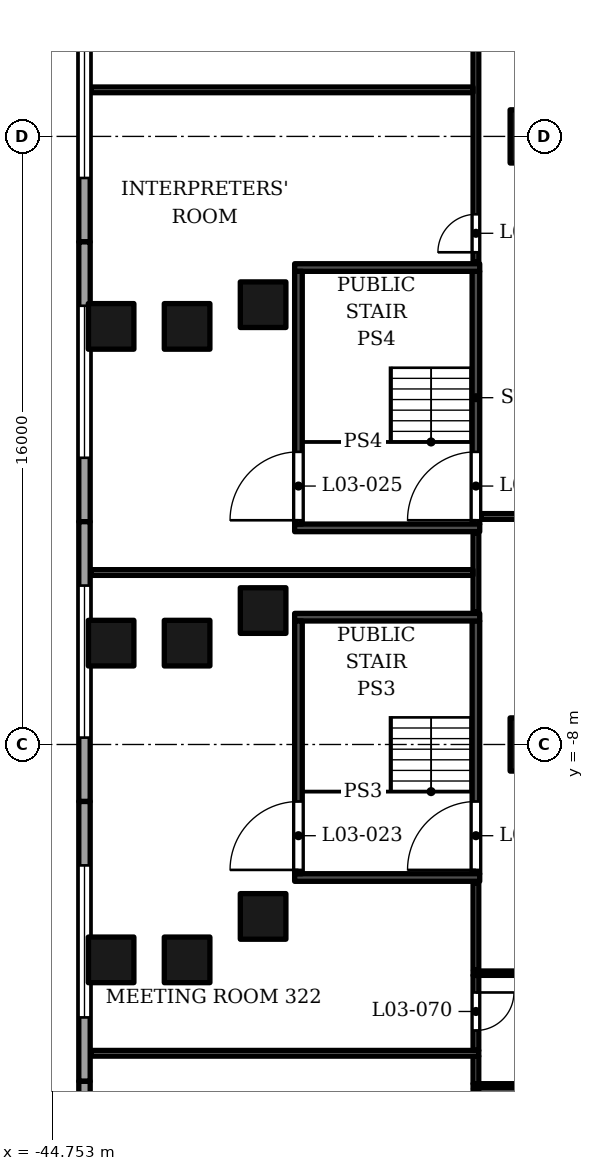
"""IFC4 building model, lengths in metres.
Left out: names, types, materials, properties, quantities, classifications, styles, units other than length and angle.
Written with IfcOpenShell. Run it as: python <this file> out.ifc"""

import sys

from ifc_helpers import new_model, si_unit, direction, frame, frame_2d, origin, origin_2d, place, context, subcontext, project, spatial, rectangle, extrude, element, fill, save


model = new_model("IFC4")
c1 = context("Model", 3, precision=1e-05, world=origin(), true_north=direction((0.0, 1.0)))
c2 = subcontext(c1, "Body", "Model", "MODEL_VIEW")
j1 = project(units=[si_unit("LENGTHUNIT", "METRE"), si_unit("PLANEANGLEUNIT", "RADIAN")], contexts=[c1])
p1 = place(None, origin())
s1 = spatial("IfcSite", under=j1, at=p1, CompositionType="ELEMENT")
p2 = place(p1, origin())
s2 = spatial("IfcBuilding", under=s1, at=p2, CompositionType="ELEMENT")
p3 = place(p2, frame((0.0, 0.0, 29.0)))
s3 = spatial("IfcBuildingStorey", under=s2, at=p3, CompositionType="ELEMENT", Elevation=29.0)
for number, where, z_axis, x_axis in (
    (1, (-32.0, -8.0, 0.0), (0.0, 0.0, 1.0), (1.0, 0.0, 0.0)),
    (2, (-32.0, 8.0, 0.0), (0.0, 0.0, 1.0), (1.0, 0.0, 0.0)),
):
    element("IfcColumn", number, at=place(p3, frame(where, z_axis=z_axis, x_axis=x_axis)), inside=s3, PredefinedType="COLUMN", context=c2, shape_type="SweptSolid", body=[
        extrude(rectangle(XDim=1.4, YDim=1.4, at=origin_2d()), origin(), (0.0, 0.0, 1.0), 5.5),
    ])
for number, where, z_axis, x_axis in (
    (3, (-39.2, -12.524, 0.0), (0.0, 0.0, 1.0), (1.0, 0.0, 0.0)),
    (4, (-39.2, -4.476, 0.0), (0.0, 0.0, 1.0), (1.0, 0.0, 0.0)),
    (5, (-39.2, 3.572, 0.0), (0.0, 0.0, 1.0), (1.0, 0.0, 0.0)),
    (6, (-41.2, -13.667, 0.0), (0.0, 0.0, 1.0), (1.0, 0.0, 0.0)),
    (7, (-41.2, -5.333, 0.0), (0.0, 0.0, 1.0), (1.0, 0.0, 0.0)),
    (8, (-41.2, 3.001, 0.0), (0.0, 0.0, 1.0), (1.0, 0.0, 0.0)),
    (9, (-43.2, -13.667, 0.0), (0.0, 0.0, 1.0), (1.0, 0.0, 0.0)),
    (10, (-43.2, -5.333, 0.0), (0.0, 0.0, 1.0), (1.0, 0.0, 0.0)),
    (11, (-43.2, 3.001, 0.0), (0.0, 0.0, 1.0), (1.0, 0.0, 0.0)),
):
    element("IfcColumn", number, at=place(p3, frame(where, z_axis=z_axis, x_axis=x_axis)), inside=s3, PredefinedType="COLUMN", context=c2, shape_type="SweptSolid", body=[
        extrude(rectangle(XDim=1.2, YDim=1.2, at=origin_2d()), origin(), (0.0, 0.0, 1.0), 5.5),
    ])
p4 = place(p3, frame((-43.9, 12.587, 0.0), z_axis=(0.0, 0.0, 1.0), x_axis=(0.0, -1.0, 0.0)))
e12 = element("IfcWall", 12, at=p4, inside=s3, PredefinedType="SOLIDWALL", context=c2, shape_type="SweptSolid", body=[
    extrude(rectangle(XDim=7.362, YDim=0.3, at=frame_2d((3.681, 0.0))), origin(), (0.0, 0.0, 1.0), 4.1),
])
p5 = place(p4, frame((1.681, 0.0, 1.0)))
e13 = element("IfcOpeningElement", 13, at=p5, cuts=e12, PredefinedType="OPENING", context=c2, shape_type="SweptSolid", body=[
    extrude(rectangle(XDim=4.0, YDim=1.8, at=frame_2d((2.0, 0.9))), frame((0.0, 0.16, 0.0), z_axis=(0.0, -1.0, 0.0), x_axis=(1.0, 0.0, 0.0)), (0.0, 0.0, 1.0), 0.32),
])
p6 = place(p3, frame((-43.9, 5.225, 0.0), z_axis=(0.0, 0.0, 1.0), x_axis=(0.0, -1.0, 0.0)))
e14 = element("IfcWall", 14, at=p6, inside=s3, PredefinedType="SOLIDWALL", context=c2, shape_type="SweptSolid", body=[
    extrude(rectangle(XDim=7.363, YDim=0.3, at=frame_2d((3.681, 0.0))), origin(), (0.0, 0.0, 1.0), 4.1),
])
p7 = place(p6, frame((1.681, 0.0, 1.0)))
e15 = element("IfcOpeningElement", 15, at=p7, cuts=e14, PredefinedType="OPENING", context=c2, shape_type="SweptSolid", body=[
    extrude(rectangle(XDim=4.0, YDim=1.8, at=frame_2d((2.0, 0.9))), frame((0.0, 0.16, 0.0), z_axis=(0.0, -1.0, 0.0), x_axis=(1.0, 0.0, 0.0)), (0.0, 0.0, 1.0), 0.32),
])
p8 = place(p3, frame((-43.9, -2.137, 0.0), z_axis=(0.0, 0.0, 1.0), x_axis=(0.0, -1.0, 0.0)))
e16 = element("IfcWall", 16, at=p8, inside=s3, PredefinedType="SOLIDWALL", context=c2, shape_type="SweptSolid", body=[
    extrude(rectangle(XDim=7.363, YDim=0.3, at=frame_2d((3.681, 0.0))), origin(), (0.0, 0.0, 1.0), 4.1),
])
p9 = place(p8, frame((1.681, 0.0, 1.0)))
e17 = element("IfcOpeningElement", 17, at=p9, cuts=e16, PredefinedType="OPENING", context=c2, shape_type="SweptSolid", body=[
    extrude(rectangle(XDim=4.0, YDim=1.8, at=frame_2d((2.0, 0.9))), frame((0.0, 0.16, 0.0), z_axis=(0.0, -1.0, 0.0), x_axis=(1.0, 0.0, 0.0)), (0.0, 0.0, 1.0), 0.32),
])
p10 = place(p3, frame((-43.9, -9.5, 0.0), z_axis=(0.0, 0.0, 1.0), x_axis=(0.0, -1.0, 0.0)))
e18 = element("IfcWall", 18, at=p10, inside=s3, PredefinedType="SOLIDWALL", context=c2, shape_type="SweptSolid", body=[
    extrude(rectangle(XDim=7.363, YDim=0.3, at=frame_2d((3.681, 0.0))), origin(), (0.0, 0.0, 1.0), 4.1),
])
p11 = place(p10, frame((1.681, 0.0, 1.0)))
e19 = element("IfcOpeningElement", 19, at=p11, cuts=e18, PredefinedType="OPENING", context=c2, shape_type="SweptSolid", body=[
    extrude(rectangle(XDim=4.0, YDim=1.8, at=frame_2d((2.0, 0.9))), frame((0.0, 0.16, 0.0), z_axis=(0.0, -1.0, 0.0), x_axis=(1.0, 0.0, 0.0)), (0.0, 0.0, 1.0), 0.32),
])
p12 = place(p3, frame((-43.9, -16.863, 0.0), z_axis=(0.0, 0.0, 1.0), x_axis=(0.0, -1.0, 0.0)))
e20 = element("IfcWall", 20, at=p12, inside=s3, PredefinedType="SOLIDWALL", context=c2, shape_type="SweptSolid", body=[
    extrude(rectangle(XDim=7.363, YDim=0.3, at=frame_2d((3.681, 0.0))), origin(), (0.0, 0.0, 1.0), 4.1),
])
p13 = place(p12, frame((1.681, 0.0, 1.0)))
e21 = element("IfcOpeningElement", 21, at=p13, cuts=e20, PredefinedType="OPENING", context=c2, shape_type="SweptSolid", body=[
    extrude(rectangle(XDim=4.0, YDim=1.8, at=frame_2d((2.0, 0.9))), frame((0.0, 0.16, 0.0), z_axis=(0.0, -1.0, 0.0), x_axis=(1.0, 0.0, 0.0)), (0.0, 0.0, 1.0), 0.32),
])
for number, where, z_axis, x_axis in (
    (22, (-43.85, 19.79, 5.5), (0.0, 0.0, 1.0), (0.0, -1.0, 0.0)),
    (23, (-43.85, 5.093, 5.5), (0.0, 0.0, 1.0), (0.0, -1.0, 0.0)),
    (24, (-43.85, -9.605, 5.5), (0.0, 0.0, 1.0), (0.0, -1.0, 0.0)),
):
    element("IfcWall", number, at=place(p3, frame(where, z_axis=z_axis, x_axis=x_axis)), inside=s3, PredefinedType="PARAPET", context=c2, shape_type="SweptSolid", body=[
        extrude(rectangle(XDim=14.698, YDim=0.3, at=frame_2d((7.349, 0.0))), origin(), (0.0, 0.0, 1.0), 1.1),
    ])
for number, where, z_axis, x_axis in (
    (25, (-38.37, -11.5, 0.0), (0.0, 0.0, 1.0), (1.0, 0.0, 0.0)),
    (26, (-38.37, -4.65, 0.0), (0.0, 0.0, 1.0), (1.0, 0.0, 0.0)),
):
    element("IfcWall", number, at=place(p3, frame(where, z_axis=z_axis, x_axis=x_axis)), inside=s3, PredefinedType="SOLIDWALL", context=c2, shape_type="SweptSolid", body=[
        extrude(rectangle(XDim=4.87, YDim=0.2, at=frame_2d((2.435, 0.0))), origin(), (0.0, 0.0, 1.0), 5.05),
    ])
p14 = place(p3, frame((-38.27, -11.4, 0.0), z_axis=(0.0, 0.0, 1.0), x_axis=(0.0, 1.0, 0.0)))
e27 = element("IfcWall", 27, at=p14, inside=s3, PredefinedType="SOLIDWALL", context=c2, shape_type="SweptSolid", body=[
    extrude(rectangle(XDim=6.65, YDim=0.2, at=frame_2d((3.325, 0.0))), origin(), (0.0, 0.0, 1.0), 5.05),
])
p15 = place(p14, frame((0.1, 0.0, 0.0)))
e28 = element("IfcOpeningElement", 28, at=p15, cuts=e27, PredefinedType="OPENING", context=c2, shape_type="SweptSolid", body=[
    extrude(rectangle(XDim=1.8, YDim=2.4, at=frame_2d((0.9, 1.2))), frame((0.0, 0.11, 0.0), z_axis=(0.0, -1.0, 0.0), x_axis=(1.0, 0.0, 0.0)), (0.0, 0.0, 1.0), 0.22),
])
p16 = place(p3, frame((-33.6, -11.4, 0.0), z_axis=(0.0, 0.0, 1.0), x_axis=(0.0, 1.0, 0.0)))
e29 = element("IfcWall", 29, at=p16, inside=s3, PredefinedType="SOLIDWALL", context=c2, shape_type="SweptSolid", body=[
    extrude(rectangle(XDim=6.65, YDim=0.2, at=frame_2d((3.325, 0.0))), origin(), (0.0, 0.0, 1.0), 5.05),
])
p17 = place(p16, frame((0.1, 0.0, 0.0)))
e30 = element("IfcOpeningElement", 30, at=p17, cuts=e29, PredefinedType="OPENING", context=c2, shape_type="SweptSolid", body=[
    extrude(rectangle(XDim=1.8, YDim=2.4, at=frame_2d((0.9, 1.2))), frame((0.0, 0.11, 0.0), z_axis=(0.0, -1.0, 0.0), x_axis=(1.0, 0.0, 0.0)), (0.0, 0.0, 1.0), 0.22),
])
for number, where, z_axis, x_axis in (
    (31, (-38.37, -2.3, 0.0), (0.0, 0.0, 1.0), (1.0, 0.0, 0.0)),
    (32, (-38.37, 4.55, 0.0), (0.0, 0.0, 1.0), (1.0, 0.0, 0.0)),
):
    element("IfcWall", number, at=place(p3, frame(where, z_axis=z_axis, x_axis=x_axis)), inside=s3, PredefinedType="SOLIDWALL", context=c2, shape_type="SweptSolid", body=[
        extrude(rectangle(XDim=4.87, YDim=0.2, at=frame_2d((2.435, 0.0))), origin(), (0.0, 0.0, 1.0), 5.05),
    ])
p18 = place(p3, frame((-38.27, -2.2, 0.0), z_axis=(0.0, 0.0, 1.0), x_axis=(0.0, 1.0, 0.0)))
e33 = element("IfcWall", 33, at=p18, inside=s3, PredefinedType="SOLIDWALL", context=c2, shape_type="SweptSolid", body=[
    extrude(rectangle(XDim=6.65, YDim=0.2, at=frame_2d((3.325, 0.0))), origin(), (0.0, 0.0, 1.0), 5.05),
])
p19 = place(p18, frame((0.1, 0.0, 0.0)))
e34 = element("IfcOpeningElement", 34, at=p19, cuts=e33, PredefinedType="OPENING", context=c2, shape_type="SweptSolid", body=[
    extrude(rectangle(XDim=1.8, YDim=2.4, at=frame_2d((0.9, 1.2))), frame((0.0, 0.11, 0.0), z_axis=(0.0, -1.0, 0.0), x_axis=(1.0, 0.0, 0.0)), (0.0, 0.0, 1.0), 0.22),
])
p20 = place(p3, frame((-33.6, -2.2, 0.0), z_axis=(0.0, 0.0, 1.0), x_axis=(0.0, 1.0, 0.0)))
e35 = element("IfcWall", 35, at=p20, inside=s3, PredefinedType="SOLIDWALL", context=c2, shape_type="SweptSolid", body=[
    extrude(rectangle(XDim=6.65, YDim=0.2, at=frame_2d((3.325, 0.0))), origin(), (0.0, 0.0, 1.0), 5.05),
])
p21 = place(p20, frame((0.1, 0.0, 0.0)))
e36 = element("IfcOpeningElement", 36, at=p21, cuts=e35, PredefinedType="OPENING", context=c2, shape_type="SweptSolid", body=[
    extrude(rectangle(XDim=1.8, YDim=2.4, at=frame_2d((0.9, 1.2))), frame((0.0, 0.11, 0.0), z_axis=(0.0, -1.0, 0.0), x_axis=(1.0, 0.0, 0.0)), (0.0, 0.0, 1.0), 0.22),
])
p22 = place(p3, frame((-33.6, -20.61, 0.0), z_axis=(0.0, 0.0, 1.0), x_axis=(0.0, 1.0, 0.0)))
e37 = element("IfcWall", 37, at=p22, inside=s3, PredefinedType="PARTITIONING", context=c2, shape_type="SweptSolid", body=[
    extrude(rectangle(XDim=3.535, YDim=0.15, at=frame_2d((1.768, 0.0))), origin(), (0.0, 0.0, 1.0), 5.05),
])
p23 = place(p3, frame((-33.675, -16.982, 0.0), z_axis=(0.0, 0.0, 1.0), x_axis=(1.0, 0.0, 0.0)))
e38 = element("IfcWall", 38, at=p23, inside=s3, PredefinedType="PARTITIONING", context=c2, shape_type="SweptSolid", body=[
    extrude(rectangle(XDim=18.905, YDim=0.115, at=frame_2d((9.453, 0.0))), origin(), (0.0, 0.0, 1.0), 3.85),
])
p24 = place(p23, frame((4.275, 0.0, 0.0)))
e39 = element("IfcOpeningElement", 39, at=p24, cuts=e38, PredefinedType="OPENING", context=c2, shape_type="SweptSolid", body=[
    extrude(rectangle(XDim=1.0, YDim=2.1, at=frame_2d((0.5, 1.05))), frame((0.0, 0.067, 0.0), z_axis=(0.0, -1.0, 0.0), x_axis=(1.0, 0.0, 0.0)), (0.0, 0.0, 1.0), 0.135),
])
p25 = place(p3, frame((-33.6, -16.925, 0.0), z_axis=(0.0, 0.0, 1.0), x_axis=(0.0, 1.0, 0.0)))
e40 = element("IfcWall", 40, at=p25, inside=s3, PredefinedType="PARTITIONING", context=c2, shape_type="SweptSolid", body=[
    extrude(rectangle(XDim=0.725, YDim=0.15, at=frame_2d((0.363, 0.0))), origin(), (0.0, 0.0, 1.0), 5.05),
])
p26 = place(p3, frame((-43.72, -16.125, 0.0), z_axis=(0.0, 0.0, 1.0), x_axis=(1.0, 0.0, 0.0)))
e41 = element("IfcWall", 41, at=p26, inside=s3, PredefinedType="PARTITIONING", context=c2, shape_type="SweptSolid", body=[
    extrude(rectangle(XDim=10.195, YDim=0.15, at=frame_2d((5.098, 0.0))), origin(), (0.0, 0.0, 1.0), 4.15),
])
p27 = place(p3, frame((-33.6, -16.05, 0.0), z_axis=(0.0, 0.0, 1.0), x_axis=(0.0, 1.0, 0.0)))
e42 = element("IfcWall", 42, at=p27, inside=s3, PredefinedType="PARTITIONING", context=c2, shape_type="SweptSolid", body=[
    extrude(rectangle(XDim=1.975, YDim=0.15, at=frame_2d((0.988, 0.0))), origin(), (0.0, 0.0, 1.0), 5.05),
])
p28 = place(p27, frame((0.525, 0.0, 0.0)))
e43 = element("IfcOpeningElement", 43, at=p28, cuts=e42, PredefinedType="OPENING", context=c2, shape_type="SweptSolid", body=[
    extrude(rectangle(XDim=1.0, YDim=2.1, at=frame_2d((0.5, 1.05))), frame((0.0, 0.085, 0.0), z_axis=(0.0, -1.0, 0.0), x_axis=(1.0, 0.0, 0.0)), (0.0, 0.0, 1.0), 0.17),
])
p29 = place(p3, frame((-33.675, -14.018, 0.0), z_axis=(0.0, 0.0, 1.0), x_axis=(1.0, 0.0, 0.0)))
e44 = element("IfcWall", 44, at=p29, inside=s3, PredefinedType="PARTITIONING", context=c2, shape_type="SweptSolid", body=[
    extrude(rectangle(XDim=18.905, YDim=0.115, at=frame_2d((9.453, 0.0))), origin(), (0.0, 0.0, 1.0), 3.85),
])
p30 = place(p29, frame((4.425, 0.0, 0.0)))
e45 = element("IfcOpeningElement", 45, at=p30, cuts=e44, PredefinedType="OPENING", context=c2, shape_type="SweptSolid", body=[
    extrude(rectangle(XDim=1.0, YDim=2.1, at=frame_2d((0.5, 1.05))), frame((0.0, 0.067, 0.0), z_axis=(0.0, -1.0, 0.0), x_axis=(1.0, 0.0, 0.0)), (0.0, 0.0, 1.0), 0.135),
])
p31 = place(p3, frame((-33.6, -13.925, 0.0), z_axis=(0.0, 0.0, 1.0), x_axis=(0.0, 1.0, 0.0)))
e46 = element("IfcWall", 46, at=p31, inside=s3, PredefinedType="PARTITIONING", context=c2, shape_type="SweptSolid", body=[
    extrude(rectangle(XDim=2.285, YDim=0.15, at=frame_2d((1.143, 0.0))), origin(), (0.0, 0.0, 1.0), 5.05),
])
p32 = place(p3, frame((-33.6, -4.51, 0.0), z_axis=(0.0, 0.0, 1.0), x_axis=(0.0, 1.0, 0.0)))
e47 = element("IfcWall", 47, at=p32, inside=s3, PredefinedType="PARTITIONING", context=c2, shape_type="SweptSolid", body=[
    extrude(rectangle(XDim=2.07, YDim=0.15, at=frame_2d((1.035, 0.0))), origin(), (0.0, 0.0, 1.0), 5.05),
])
p33 = place(p3, frame((-43.72, -3.475, 0.0), z_axis=(0.0, 0.0, 1.0), x_axis=(1.0, 0.0, 0.0)))
e48 = element("IfcWall", 48, at=p33, inside=s3, PredefinedType="PARTITIONING", context=c2, shape_type="SweptSolid", body=[
    extrude(rectangle(XDim=10.045, YDim=0.15, at=frame_2d((5.022, 0.0))), origin(), (0.0, 0.0, 1.0), 4.15),
])
p34 = place(p3, frame((-33.46, -2.0, 0.0), z_axis=(0.0, 0.0, 1.0), x_axis=(1.0, 0.0, 0.0)))
e49 = element("IfcWall", 49, at=p34, inside=s3, PredefinedType="PARTITIONING", context=c2, shape_type="SweptSolid", body=[
    extrude(rectangle(XDim=66.92, YDim=0.15, at=frame_2d((33.46, 0.0))), origin(), (0.0, 0.0, 1.0), 3.85),
])
p35 = place(p34, frame((19.91, 0.0, 0.0)))
e50 = element("IfcOpeningElement", 50, at=p35, cuts=e49, PredefinedType="OPENING", context=c2, shape_type="SweptSolid", body=[
    extrude(rectangle(XDim=1.2, YDim=2.1, at=frame_2d((0.6, 1.05))), frame((0.0, 0.085, 0.0), z_axis=(0.0, -1.0, 0.0), x_axis=(1.0, 0.0, 0.0)), (0.0, 0.0, 1.0), 0.17),
])
p36 = place(p34, frame((45.91, 0.0, 0.0)))
e51 = element("IfcOpeningElement", 51, at=p36, cuts=e49, PredefinedType="OPENING", context=c2, shape_type="SweptSolid", body=[
    extrude(rectangle(XDim=1.2, YDim=2.1, at=frame_2d((0.6, 1.05))), frame((0.0, 0.085, 0.0), z_axis=(0.0, -1.0, 0.0), x_axis=(1.0, 0.0, 0.0)), (0.0, 0.0, 1.0), 0.17),
])
p37 = place(p34, frame((30.11, 0.0, 0.0)))
e52 = element("IfcOpeningElement", 52, at=p37, cuts=e49, PredefinedType="OPENING", context=c2, shape_type="SweptSolid", body=[
    extrude(rectangle(XDim=1.0, YDim=2.1, at=frame_2d((0.5, 1.05))), frame((0.0, 0.085, 0.0), z_axis=(0.0, -1.0, 0.0), x_axis=(1.0, 0.0, 0.0)), (0.0, 0.0, 1.0), 0.17),
])
p38 = place(p34, frame((35.86, 0.0, 0.0)))
e53 = element("IfcOpeningElement", 53, at=p38, cuts=e49, PredefinedType="OPENING", context=c2, shape_type="SweptSolid", body=[
    extrude(rectangle(XDim=1.0, YDim=2.1, at=frame_2d((0.5, 1.05))), frame((0.0, 0.085, 0.0), z_axis=(0.0, -1.0, 0.0), x_axis=(1.0, 0.0, 0.0)), (0.0, 0.0, 1.0), 0.17),
])
p39 = place(p3, frame((-33.6, 4.69, 0.0), z_axis=(0.0, 0.0, 1.0), x_axis=(0.0, 1.0, 0.0)))
e54 = element("IfcWall", 54, at=p39, inside=s3, PredefinedType="PARTITIONING", context=c2, shape_type="SweptSolid", body=[
    extrude(rectangle(XDim=9.07, YDim=0.15, at=frame_2d((4.535, 0.0))), origin(), (0.0, 0.0, 1.0), 3.85),
])
p40 = place(p39, frame((0.261, 0.0, 0.0)))
e55 = element("IfcOpeningElement", 55, at=p40, cuts=e54, PredefinedType="OPENING", context=c2, shape_type="SweptSolid", body=[
    extrude(rectangle(XDim=1.0, YDim=2.1, at=frame_2d((0.5, 1.05))), frame((0.0, 0.085, 0.0), z_axis=(0.0, -1.0, 0.0), x_axis=(1.0, 0.0, 0.0)), (0.0, 0.0, 1.0), 0.17),
])
p41 = place(p39, frame((5.885, 0.0, 0.0)))
e56 = element("IfcOpeningElement", 56, at=p41, cuts=e54, PredefinedType="OPENING", context=c2, shape_type="SweptSolid", body=[
    extrude(rectangle(XDim=1.0, YDim=2.1, at=frame_2d((0.5, 1.05))), frame((0.0, 0.085, 0.0), z_axis=(0.0, -1.0, 0.0), x_axis=(1.0, 0.0, 0.0)), (0.0, 0.0, 1.0), 0.17),
])
p42 = place(p3, frame((-43.72, 9.225, 0.0), z_axis=(0.0, 0.0, 1.0), x_axis=(1.0, 0.0, 0.0)))
e57 = element("IfcWall", 57, at=p42, inside=s3, PredefinedType="PARTITIONING", context=c2, shape_type="SweptSolid", body=[
    extrude(rectangle(XDim=10.045, YDim=0.15, at=frame_2d((5.022, 0.0))), origin(), (0.0, 0.0, 1.0), 4.15),
])
p43 = place(p5, origin())
e58 = element("IfcWindow", 58, at=p43, inside=s3, PartitioningType="SINGLE_PANEL", PredefinedType="WINDOW", context=c2, shape_type="SweptSolid", body=[
    extrude(rectangle(XDim=4.0, YDim=1.8, at=frame_2d((2.0, 0.9))), frame((0.0, 0.03, 0.0), z_axis=(0.0, -1.0, 0.0), x_axis=(1.0, 0.0, 0.0)), (0.0, 0.0, 1.0), 0.06),
])
fill(e13, e58)
p44 = place(p7, origin())
e59 = element("IfcWindow", 59, at=p44, inside=s3, PartitioningType="SINGLE_PANEL", PredefinedType="WINDOW", context=c2, shape_type="SweptSolid", body=[
    extrude(rectangle(XDim=4.0, YDim=1.8, at=frame_2d((2.0, 0.9))), frame((0.0, 0.03, 0.0), z_axis=(0.0, -1.0, 0.0), x_axis=(1.0, 0.0, 0.0)), (0.0, 0.0, 1.0), 0.06),
])
fill(e15, e59)
p45 = place(p9, origin())
e60 = element("IfcWindow", 60, at=p45, inside=s3, PartitioningType="SINGLE_PANEL", PredefinedType="WINDOW", context=c2, shape_type="SweptSolid", body=[
    extrude(rectangle(XDim=4.0, YDim=1.8, at=frame_2d((2.0, 0.9))), frame((0.0, 0.03, 0.0), z_axis=(0.0, -1.0, 0.0), x_axis=(1.0, 0.0, 0.0)), (0.0, 0.0, 1.0), 0.06),
])
fill(e17, e60)
p46 = place(p11, origin())
e61 = element("IfcWindow", 61, at=p46, inside=s3, PartitioningType="SINGLE_PANEL", PredefinedType="WINDOW", context=c2, shape_type="SweptSolid", body=[
    extrude(rectangle(XDim=4.0, YDim=1.8, at=frame_2d((2.0, 0.9))), frame((0.0, 0.03, 0.0), z_axis=(0.0, -1.0, 0.0), x_axis=(1.0, 0.0, 0.0)), (0.0, 0.0, 1.0), 0.06),
])
fill(e19, e61)
p47 = place(p17, origin())
e62 = element("IfcDoor", 62, at=p47, inside=s3, OperationType="DOUBLE_DOOR_SINGLE_SWING", PredefinedType="DOOR", context=c2, shape_type="SweptSolid", body=[
    extrude(rectangle(XDim=1.8, YDim=2.4, at=frame_2d((0.9, 1.2))), frame((0.0, 0.025, 0.0), z_axis=(0.0, -1.0, 0.0), x_axis=(1.0, 0.0, 0.0)), (0.0, 0.0, 1.0), 0.05),
])
fill(e30, e62)
p48 = place(p15, origin())
e63 = element("IfcDoor", 63, at=p48, inside=s3, OperationType="DOUBLE_DOOR_SINGLE_SWING", PredefinedType="DOOR", context=c2, shape_type="SweptSolid", body=[
    extrude(rectangle(XDim=1.8, YDim=2.4, at=frame_2d((0.9, 1.2))), frame((0.0, 0.025, 0.0), z_axis=(0.0, -1.0, 0.0), x_axis=(1.0, 0.0, 0.0)), (0.0, 0.0, 1.0), 0.05),
])
fill(e28, e63)
p49 = place(p21, origin())
e64 = element("IfcDoor", 64, at=p49, inside=s3, OperationType="DOUBLE_DOOR_SINGLE_SWING", PredefinedType="DOOR", context=c2, shape_type="SweptSolid", body=[
    extrude(rectangle(XDim=1.8, YDim=2.4, at=frame_2d((0.9, 1.2))), frame((0.0, 0.025, 0.0), z_axis=(0.0, -1.0, 0.0), x_axis=(1.0, 0.0, 0.0)), (0.0, 0.0, 1.0), 0.05),
])
fill(e36, e64)
p50 = place(p19, origin())
e65 = element("IfcDoor", 65, at=p50, inside=s3, OperationType="DOUBLE_DOOR_SINGLE_SWING", PredefinedType="DOOR", context=c2, shape_type="SweptSolid", body=[
    extrude(rectangle(XDim=1.8, YDim=2.4, at=frame_2d((0.9, 1.2))), frame((0.0, 0.025, 0.0), z_axis=(0.0, -1.0, 0.0), x_axis=(1.0, 0.0, 0.0)), (0.0, 0.0, 1.0), 0.05),
])
fill(e34, e65)
p51 = place(p28, origin())
e66 = element("IfcDoor", 66, at=p51, inside=s3, OperationType="SINGLE_SWING_RIGHT", PredefinedType="DOOR", context=c2, shape_type="SweptSolid", body=[
    extrude(rectangle(XDim=1.0, YDim=2.1, at=frame_2d((0.5, 1.05))), frame((0.0, 0.025, 0.0), z_axis=(0.0, -1.0, 0.0), x_axis=(1.0, 0.0, 0.0)), (0.0, 0.0, 1.0), 0.05),
])
fill(e43, e66)
p52 = place(p40, origin())
e67 = element("IfcDoor", 67, at=p52, inside=s3, OperationType="SINGLE_SWING_LEFT", PredefinedType="DOOR", context=c2, shape_type="SweptSolid", body=[
    extrude(rectangle(XDim=1.0, YDim=2.1, at=frame_2d((0.5, 1.05))), frame((0.0, 0.025, 0.0), z_axis=(0.0, -1.0, 0.0), x_axis=(1.0, 0.0, 0.0)), (0.0, 0.0, 1.0), 0.05),
])
fill(e55, e67)
save(model, sys.argv[1])
